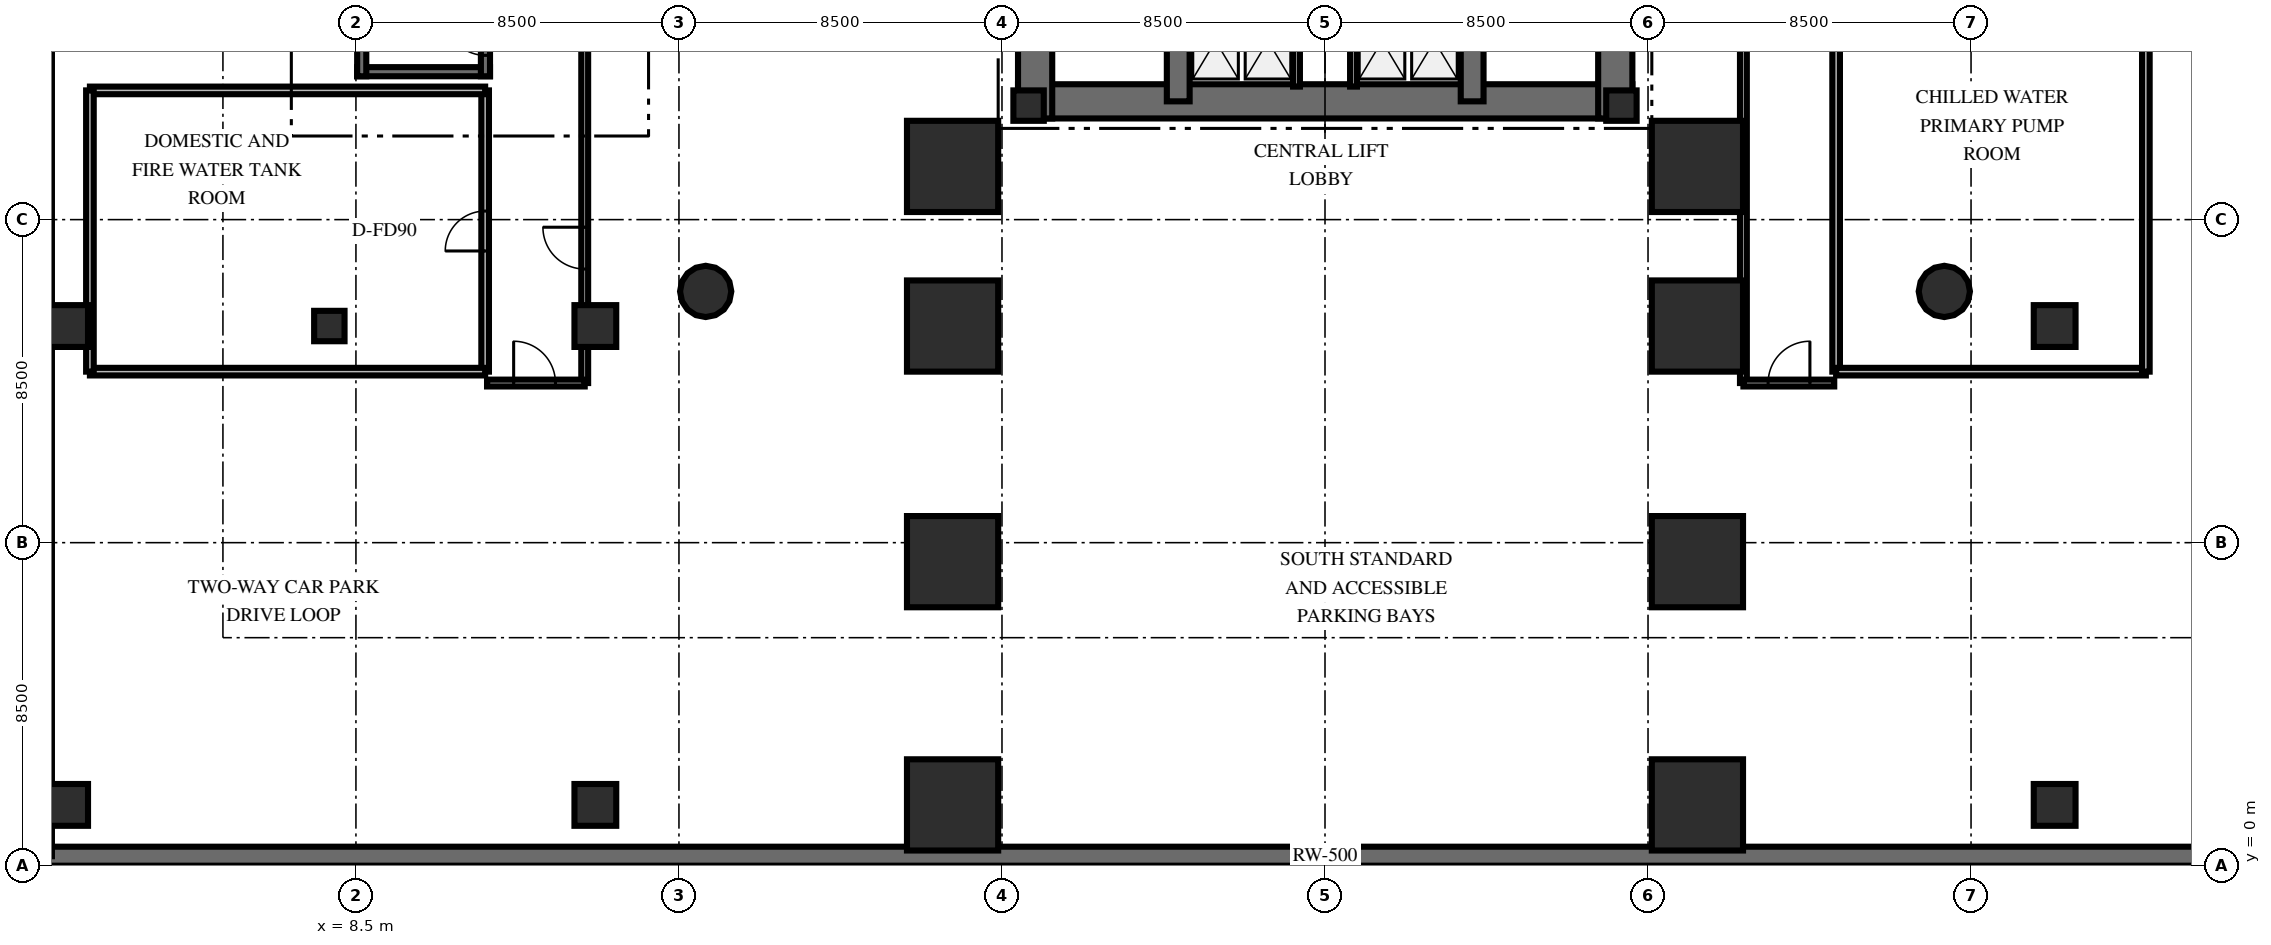
"""IFC4 building model, lengths in metres.
Left out: names, types, materials, properties, quantities, classifications, styles, units other than length and angle.
Written with IfcOpenShell. Run it as: python <this file> out.ifc"""

import sys

from ifc_helpers import new_model, si_unit, direction, frame, frame_2d, origin, origin_2d, place, context, subcontext, project, spatial, rectangle, circle, extrude, element, fill, save


model = new_model("IFC4")
c1 = context("Model", 3, precision=1e-05, world=origin(), true_north=direction((0.0, 1.0)))
c2 = subcontext(c1, "Body", "Model", "MODEL_VIEW")
j1 = project(units=[si_unit("LENGTHUNIT", "METRE"), si_unit("PLANEANGLEUNIT", "RADIAN")], contexts=[c1])
p1 = place(None, origin())
s1 = spatial("IfcSite", under=j1, at=p1, CompositionType="ELEMENT")
p2 = place(p1, origin())
s2 = spatial("IfcBuilding", under=s1, at=p2, CompositionType="ELEMENT")
p3 = place(p2, frame((0.0, 0.0, -9.6)))
s3 = spatial("IfcBuildingStorey", under=s2, at=p3, CompositionType="ELEMENT", Elevation=-9.6)
p4 = place(p3, frame((0.25, 0.25, 0.0), z_axis=(0.0, 0.0, 1.0), x_axis=(1.0, 0.0, 0.0)))
e1 = element("IfcWall", 1, at=p4, inside=s3, PredefinedType="SOLIDWALL", context=c2, shape_type="SweptSolid", body=[
    extrude(rectangle(XDim=67.5, YDim=0.5, at=frame_2d((33.75, 0.0))), origin(), (0.0, 0.0, 1.0), 4.8),
])
p5 = place(p3, frame((25.922, 20.112, 0.0), z_axis=(0.0, 0.0, 1.0), x_axis=(1.0, 0.0, 0.0)))
e2 = element("IfcWall", 2, at=p5, inside=s3, PredefinedType="SHEAR", context=c2, shape_type="SweptSolid", body=[
    extrude(rectangle(XDim=16.166, YDim=0.9, at=frame_2d((8.083, 0.0))), origin(), (0.0, 0.0, 1.0), 4.8),
])
for number, where, z_axis, x_axis in (
    (3, (26.372, 19.662, 0.0), (0.0, 0.0, 1.0), (0.0, 1.0, 0.0)),
    (4, (41.638, 19.662, 0.0), (0.0, 0.0, 1.0), (0.0, 1.0, 0.0)),
):
    element("IfcWall", number, at=place(p3, frame(where, z_axis=z_axis, x_axis=x_axis)), inside=s3, PredefinedType="SHEAR", context=c2, shape_type="SweptSolid", body=[
        extrude(rectangle(XDim=10.876, YDim=0.9, at=frame_2d((5.438, 0.0))), origin(), (0.0, 0.0, 1.0), 4.8),
    ])
for number, where, z_axis, x_axis in (
    (5, (30.138, 20.112, 0.0), (0.0, 0.0, 1.0), (0.0, 1.0, 0.0)),
    (6, (37.872, 20.112, 0.0), (0.0, 0.0, 1.0), (0.0, 1.0, 0.0)),
):
    element("IfcWall", number, at=place(p3, frame(where, z_axis=z_axis, x_axis=x_axis)), inside=s3, PredefinedType="SHEAR", context=c2, shape_type="SweptSolid", body=[
        extrude(rectangle(XDim=9.976, YDim=0.6, at=frame_2d((4.988, 0.0))), origin(), (0.0, 0.0, 1.0), 4.8),
    ])
for number, where, z_axis, x_axis in (
    (7, (26.2, 20.0, 0.0), (0.0, 0.0, 1.0), (1.0, 0.0, 0.0)),
    (8, (41.8, 20.0, 0.0), (0.0, 0.0, 1.0), (1.0, 0.0, 0.0)),
):
    element("IfcColumn", number, at=place(p3, frame(where, z_axis=z_axis, x_axis=x_axis)), inside=s3, PredefinedType="PILASTER", context=c2, shape_type="SweptSolid", body=[
        extrude(rectangle(XDim=0.8, YDim=0.8, at=origin_2d()), origin(), (0.0, 0.0, 1.0), 4.8),
    ])
p6 = place(p3, frame((8.532, 20.892, 0.0), z_axis=(0.0, 0.0, 1.0), x_axis=(1.0, 0.0, 0.0)))
e9 = element("IfcWall", 9, at=p6, inside=s3, PredefinedType="SHEAR", context=c2, shape_type="SweptSolid", body=[
    extrude(rectangle(XDim=3.496, YDim=0.24, at=frame_2d((1.748, 0.0))), origin(), (0.0, 0.0, 1.0), 4.8),
])
p7 = place(p3, frame((8.652, 20.772, 0.0), z_axis=(0.0, 0.0, 1.0), x_axis=(0.0, 1.0, 0.0)))
e10 = element("IfcWall", 10, at=p7, inside=s3, PredefinedType="SHEAR", context=c2, shape_type="SweptSolid", body=[
    extrude(rectangle(XDim=9.556, YDim=0.24, at=frame_2d((4.778, 0.0))), origin(), (0.0, 0.0, 1.0), 4.8),
])
p8 = place(p3, frame((11.908, 20.772, 0.0), z_axis=(0.0, 0.0, 1.0), x_axis=(0.0, 1.0, 0.0)))
e11 = element("IfcWall", 11, at=p8, inside=s3, PredefinedType="SHEAR", context=c2, shape_type="SweptSolid", body=[
    extrude(rectangle(XDim=9.556, YDim=0.24, at=frame_2d((4.778, 0.0))), origin(), (0.0, 0.0, 1.0), 4.8),
])
p9 = place(p8, frame((0.55, 0.0, 0.0)))
e12 = element("IfcOpeningElement", 12, at=p9, cuts=e11, PredefinedType="OPENING", context=c2, shape_type="SweptSolid", body=[
    extrude(rectangle(XDim=1.05, YDim=2.15, at=frame_2d((0.525, 1.075))), frame((0.0, 0.13, 0.0), z_axis=(0.0, -1.0, 0.0), x_axis=(1.0, 0.0, 0.0)), (0.0, 0.0, 1.0), 0.26),
])
for number, where, z_axis, x_axis in (
    (13, (24.2, 1.6, 0.0), (0.0, 0.0, 1.0), (1.0, 0.0, 0.0)),
    (14, (24.2, 8.0, 0.0), (0.0, 0.0, 1.0), (1.0, 0.0, 0.0)),
    (15, (24.2, 14.2, 0.0), (0.0, 0.0, 1.0), (1.0, 0.0, 0.0)),
    (16, (24.2, 18.4, 0.0), (0.0, 0.0, 1.0), (1.0, 0.0, 0.0)),
    (17, (43.8, 1.6, 0.0), (0.0, 0.0, 1.0), (1.0, 0.0, 0.0)),
    (18, (43.8, 8.0, 0.0), (0.0, 0.0, 1.0), (1.0, 0.0, 0.0)),
    (19, (43.8, 14.2, 0.0), (0.0, 0.0, 1.0), (1.0, 0.0, 0.0)),
    (20, (43.8, 18.4, 0.0), (0.0, 0.0, 1.0), (1.0, 0.0, 0.0)),
):
    element("IfcColumn", number, at=place(p3, frame(where, z_axis=z_axis, x_axis=x_axis)), inside=s3, PredefinedType="USERDEFINED", context=c2, shape_type="SweptSolid", body=[
        extrude(rectangle(XDim=2.4, YDim=2.4, at=origin_2d()), origin(), (0.0, 0.0, 1.0), 4.8),
    ])
for number, where, z_axis, x_axis in (
    (21, (0.9, 1.6, 0.0), (0.0, 0.0, 1.0), (1.0, 0.0, 0.0)),
    (22, (0.9, 14.2, 0.0), (0.0, 0.0, 1.0), (1.0, 0.0, 0.0)),
    (23, (14.8, 1.6, 0.0), (0.0, 0.0, 1.0), (1.0, 0.0, 0.0)),
    (24, (14.8, 14.2, 0.0), (0.0, 0.0, 1.0), (1.0, 0.0, 0.0)),
    (25, (53.2, 1.6, 0.0), (0.0, 0.0, 1.0), (1.0, 0.0, 0.0)),
    (26, (53.2, 14.2, 0.0), (0.0, 0.0, 1.0), (1.0, 0.0, 0.0)),
):
    element("IfcColumn", number, at=place(p3, frame(where, z_axis=z_axis, x_axis=x_axis)), inside=s3, PredefinedType="COLUMN", context=c2, shape_type="SweptSolid", body=[
        extrude(rectangle(XDim=1.1, YDim=1.1, at=origin_2d()), origin(), (0.0, 0.0, 1.0), 4.8),
    ])
for number, where, z_axis, x_axis in (
    (27, (17.703, 15.111, 0.0), (0.0, 0.0, 1.0), (1.0, 0.0, 0.0)),
    (28, (50.297, 15.111, 0.0), (0.0, 0.0, 1.0), (1.0, 0.0, 0.0)),
):
    element("IfcColumn", number, at=place(p3, frame(where, z_axis=z_axis, x_axis=x_axis)), inside=s3, PredefinedType="COLUMN", context=c2, shape_type="SweptSolid", body=[
        extrude(circle(Radius=0.675, at=origin_2d()), origin(), (0.0, 0.0, 1.0), 4.8),
    ])
p10 = place(p3, frame((7.8, 14.2, 0.0), z_axis=(0.0, 0.0, 1.0), x_axis=(1.0, 0.0, 0.0)))
e29 = element("IfcColumn", 29, at=p10, inside=s3, PredefinedType="COLUMN", context=c2, shape_type="SweptSolid", body=[
    extrude(rectangle(XDim=0.8, YDim=0.8, at=origin_2d()), origin(), (0.0, 0.0, 1.0), 4.8),
])
for number, where, z_axis, x_axis in (
    (30, (33.25, 20.5, 0.0), (0.0, 0.0, 1.0), (0.0, 1.0, 0.0)),
    (31, (34.75, 20.5, 0.0), (0.0, 0.0, 1.0), (0.0, 1.0, 0.0)),
):
    element("IfcWall", number, at=place(p3, frame(where, z_axis=z_axis, x_axis=x_axis)), inside=s3, PredefinedType="SOLIDWALL", context=c2, shape_type="SweptSolid", body=[
        extrude(rectangle(XDim=2.42, YDim=0.18, at=frame_2d((1.21, 0.0))), origin(), (0.0, 0.0, 1.0), 3.56),
    ])
p11 = place(p3, frame((14.52, 12.7, 0.0), z_axis=(0.0, 0.0, 1.0), x_axis=(0.0, 1.0, 0.0)))
e32 = element("IfcWall", 32, at=p11, inside=s3, PredefinedType="PARTITIONING", context=c2, shape_type="SweptSolid", body=[
    extrude(rectangle(XDim=21.73, YDim=0.18, at=frame_2d((10.865, 0.0))), origin(), (0.0, 0.0, 1.0), 3.56),
])
p12 = place(p11, frame((3.0, 0.0, 0.0)))
e33 = element("IfcOpeningElement", 33, at=p12, cuts=e32, PredefinedType="OPENING", context=c2, shape_type="SweptSolid", body=[
    extrude(rectangle(XDim=1.1, YDim=2.15, at=frame_2d((0.55, 1.075))), frame((0.0, 0.1, 0.0), z_axis=(0.0, -1.0, 0.0), x_axis=(1.0, 0.0, 0.0)), (0.0, 0.0, 1.0), 0.2),
])
p13 = place(p3, frame((11.95, 12.7, 0.0), z_axis=(0.0, 0.0, 1.0), x_axis=(1.0, 0.0, 0.0)))
e34 = element("IfcWall", 34, at=p13, inside=s3, PredefinedType="PARTITIONING", context=c2, shape_type="SweptSolid", body=[
    extrude(rectangle(XDim=2.57, YDim=0.18, at=frame_2d((1.285, 0.0))), origin(), (0.0, 0.0, 1.0), 3.56),
])
p14 = place(p13, frame((0.7, 0.0, 0.0)))
e35 = element("IfcOpeningElement", 35, at=p14, cuts=e34, PredefinedType="OPENING", context=c2, shape_type="SweptSolid", body=[
    extrude(rectangle(XDim=1.1, YDim=2.15, at=frame_2d((0.55, 1.075))), frame((0.0, 0.1, 0.0), z_axis=(0.0, -1.0, 0.0), x_axis=(1.0, 0.0, 0.0)), (0.0, 0.0, 1.0), 0.2),
])
p15 = place(p3, frame((45.01, 12.7, 0.0), z_axis=(0.0, 0.0, 1.0), x_axis=(0.0, 1.0, 0.0)))
e36 = element("IfcWall", 36, at=p15, inside=s3, PredefinedType="PARTITIONING", context=c2, shape_type="SweptSolid", body=[
    extrude(rectangle(XDim=21.73, YDim=0.18, at=frame_2d((10.865, 0.0))), origin(), (0.0, 0.0, 1.0), 3.56),
])
p16 = place(p3, frame((45.01, 12.7, 0.0), z_axis=(0.0, 0.0, 1.0), x_axis=(1.0, 0.0, 0.0)))
e37 = element("IfcWall", 37, at=p16, inside=s3, PredefinedType="PARTITIONING", context=c2, shape_type="SweptSolid", body=[
    extrude(rectangle(XDim=2.39, YDim=0.18, at=frame_2d((1.195, 0.0))), origin(), (0.0, 0.0, 1.0), 3.56),
])
p17 = place(p16, frame((0.65, 0.0, 0.0)))
e38 = element("IfcOpeningElement", 38, at=p17, cuts=e37, PredefinedType="OPENING", context=c2, shape_type="SweptSolid", body=[
    extrude(rectangle(XDim=1.1, YDim=2.15, at=frame_2d((0.55, 1.075))), frame((0.0, 0.1, 0.0), z_axis=(0.0, -1.0, 0.0), x_axis=(1.0, 0.0, 0.0)), (0.0, 0.0, 1.0), 0.2),
])
p18 = place(p3, frame((11.9, 13.0, 0.0), z_axis=(0.0, 0.0, 1.0), x_axis=(0.0, 1.0, 0.0)))
e39 = element("IfcWall", 39, at=p18, inside=s3, PredefinedType="SOLIDWALL", context=c2, shape_type="SweptSolid", body=[
    extrude(rectangle(XDim=7.4, YDim=0.2, at=frame_2d((3.7, 0.0))), origin(), (0.0, 0.0, 1.0), 3.56),
])
p19 = place(p18, frame((3.175, 0.0, 0.0)))
e40 = element("IfcOpeningElement", 40, at=p19, cuts=e39, PredefinedType="OPENING", context=c2, shape_type="SweptSolid", body=[
    extrude(rectangle(XDim=1.05, YDim=2.15, at=frame_2d((0.525, 1.075))), frame((0.0, 0.11, 0.0), z_axis=(0.0, -1.0, 0.0), x_axis=(1.0, 0.0, 0.0)), (0.0, 0.0, 1.0), 0.22),
])
for number, where, z_axis, x_axis in (
    (41, (1.5, 13.0, 0.0), (0.0, 0.0, 1.0), (1.0, 0.0, 0.0)),
    (42, (11.9, 20.4, 0.0), (0.0, 0.0, 1.0), (-1.0, 0.0, 0.0)),
):
    element("IfcWall", number, at=place(p3, frame(where, z_axis=z_axis, x_axis=x_axis)), inside=s3, PredefinedType="SOLIDWALL", context=c2, shape_type="SweptSolid", body=[
        extrude(rectangle(XDim=10.4, YDim=0.2, at=frame_2d((5.2, 0.0))), origin(), (0.0, 0.0, 1.0), 3.56),
    ])
p20 = place(p3, frame((1.5, 20.4, 0.0), z_axis=(0.0, 0.0, 1.0), x_axis=(0.0, -1.0, 0.0)))
e43 = element("IfcWall", 43, at=p20, inside=s3, PredefinedType="SOLIDWALL", context=c2, shape_type="SweptSolid", body=[
    extrude(rectangle(XDim=7.4, YDim=0.2, at=frame_2d((3.7, 0.0))), origin(), (0.0, 0.0, 1.0), 3.56),
])
p21 = place(p3, frame((47.45, 36.6, 0.0), z_axis=(0.0, 0.0, 1.0), x_axis=(0.0, -1.0, 0.0)))
e44 = element("IfcWall", 44, at=p21, inside=s3, PredefinedType="SOLIDWALL", context=c2, shape_type="SweptSolid", body=[
    extrude(rectangle(XDim=23.6, YDim=0.2, at=frame_2d((11.8, 0.0))), origin(), (0.0, 0.0, 1.0), 3.56),
])
p22 = place(p21, frame((11.275, 0.0, 0.0)))
e45 = element("IfcOpeningElement", 45, at=p22, cuts=e44, PredefinedType="OPENING", context=c2, shape_type="SweptSolid", body=[
    extrude(rectangle(XDim=1.05, YDim=2.15, at=frame_2d((0.525, 1.075))), frame((0.0, 0.11, 0.0), z_axis=(0.0, -1.0, 0.0), x_axis=(1.0, 0.0, 0.0)), (0.0, 0.0, 1.0), 0.22),
])
p23 = place(p3, frame((47.45, 13.0, 0.0), z_axis=(0.0, 0.0, 1.0), x_axis=(1.0, 0.0, 0.0)))
e46 = element("IfcWall", 46, at=p23, inside=s3, PredefinedType="SOLIDWALL", context=c2, shape_type="SweptSolid", body=[
    extrude(rectangle(XDim=8.15, YDim=0.2, at=frame_2d((4.075, 0.0))), origin(), (0.0, 0.0, 1.0), 3.56),
])
p24 = place(p3, frame((55.6, 13.0, 0.0), z_axis=(0.0, 0.0, 1.0), x_axis=(0.0, 1.0, 0.0)))
e47 = element("IfcWall", 47, at=p24, inside=s3, PredefinedType="SOLIDWALL", context=c2, shape_type="SweptSolid", body=[
    extrude(rectangle(XDim=23.6, YDim=0.2, at=frame_2d((11.8, 0.0))), origin(), (0.0, 0.0, 1.0), 3.56),
])
p25 = place(p9, origin())
e48 = element("IfcDoor", 48, at=p25, inside=s3, OperationType="SINGLE_SWING_RIGHT", PredefinedType="DOOR", context=c2, shape_type="SweptSolid", body=[
    extrude(rectangle(XDim=1.05, YDim=2.15, at=frame_2d((0.525, 1.075))), frame((0.0, 0.025, 0.0), z_axis=(0.0, -1.0, 0.0), x_axis=(1.0, 0.0, 0.0)), (0.0, 0.0, 1.0), 0.05),
])
fill(e12, e48)
p26 = place(p12, origin())
e49 = element("IfcDoor", 49, at=p26, inside=s3, OperationType="SINGLE_SWING_RIGHT", PredefinedType="DOOR", context=c2, shape_type="SweptSolid", body=[
    extrude(rectangle(XDim=1.1, YDim=2.15, at=frame_2d((0.55, 1.075))), frame((0.0, 0.025, 0.0), z_axis=(0.0, -1.0, 0.0), x_axis=(1.0, 0.0, 0.0)), (0.0, 0.0, 1.0), 0.05),
])
fill(e33, e49)
p27 = place(p14, origin())
e50 = element("IfcDoor", 50, at=p27, inside=s3, OperationType="SINGLE_SWING_LEFT", PredefinedType="DOOR", context=c2, shape_type="SweptSolid", body=[
    extrude(rectangle(XDim=1.1, YDim=2.15, at=frame_2d((0.55, 1.075))), frame((0.0, 0.025, 0.0), z_axis=(0.0, -1.0, 0.0), x_axis=(1.0, 0.0, 0.0)), (0.0, 0.0, 1.0), 0.05),
])
fill(e35, e50)
p28 = place(p17, origin())
e51 = element("IfcDoor", 51, at=p28, inside=s3, OperationType="SINGLE_SWING_RIGHT", PredefinedType="DOOR", context=c2, shape_type="SweptSolid", body=[
    extrude(rectangle(XDim=1.1, YDim=2.15, at=frame_2d((0.55, 1.075))), frame((0.0, 0.025, 0.0), z_axis=(0.0, -1.0, 0.0), x_axis=(1.0, 0.0, 0.0)), (0.0, 0.0, 1.0), 0.05),
])
fill(e38, e51)
p29 = place(p19, origin())
e52 = element("IfcDoor", 52, at=p29, inside=s3, OperationType="SINGLE_SWING_LEFT", PredefinedType="DOOR", context=c2, shape_type="SweptSolid", body=[
    extrude(rectangle(XDim=1.05, YDim=2.15, at=frame_2d((0.525, 1.075))), frame((0.0, 0.025, 0.0), z_axis=(0.0, -1.0, 0.0), x_axis=(1.0, 0.0, 0.0)), (0.0, 0.0, 1.0), 0.05),
])
fill(e40, e52)
save(model, sys.argv[1])
